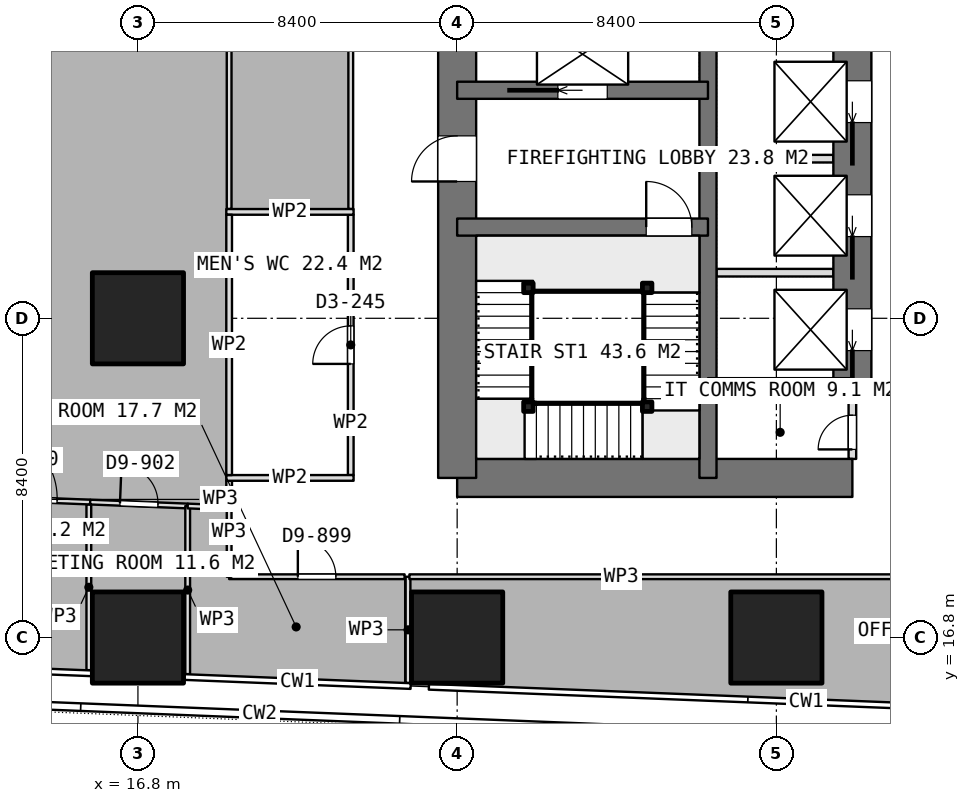
"""IFC4 building model, lengths in metres.
Left out: names, types, materials, properties, quantities, classifications, styles, units other than length and angle.
Written with IfcOpenShell. Run it as: python <this file> out.ifc"""

import sys

from ifc_helpers import new_model, si_unit, direction, frame, frame_2d, origin, origin_2d, place, context, subcontext, project, spatial, rectangle, extrude, element, fill, save


model = new_model("IFC4")
c1 = context("Model", 3, precision=1e-05, world=origin(), true_north=direction((0.0, 1.0)))
c2 = subcontext(c1, "Body", "Model", "MODEL_VIEW")
j1 = project(units=[si_unit("LENGTHUNIT", "METRE"), si_unit("PLANEANGLEUNIT", "RADIAN")], contexts=[c1])
p1 = place(None, origin())
s1 = spatial("IfcSite", under=j1, at=p1, CompositionType="ELEMENT")
p2 = place(p1, origin())
s2 = spatial("IfcBuilding", under=s1, at=p2, CompositionType="ELEMENT")
p3 = place(p2, frame((0.0, 0.0, 228.95)))
s3 = spatial("IfcBuildingStorey", under=s2, at=p3, CompositionType="ELEMENT", Elevation=228.95)
p4 = place(p3, frame((25.2, 21.0, 0.0), z_axis=(0.0, 0.0, 1.0), x_axis=(1.0, 0.0, 0.0)))
e1 = element("IfcWall", 1, at=p4, inside=s3, PredefinedType="SHEAR", context=c2, shape_type="SweptSolid", body=[
    extrude(rectangle(XDim=10.4, YDim=1.0, at=frame_2d((5.2, 0.0))), origin(), (0.0, 0.0, 1.0), 3.75),
])
p5 = place(p3, frame((25.2, 21.0, 0.0), z_axis=(0.0, 0.0, 1.0), x_axis=(0.0, 1.0, 0.0)))
e2 = element("IfcWall", 2, at=p5, inside=s3, PredefinedType="SHEAR", context=c2, shape_type="SweptSolid", body=[
    extrude(rectangle(XDim=25.2, YDim=1.0, at=frame_2d((12.6, 0.0))), origin(), (0.0, 0.0, 1.0), 3.75),
])
p6 = place(p5, frame((7.8, 0.0, 0.0)))
e3 = element("IfcOpeningElement", 3, at=p6, cuts=e2, PredefinedType="OPENING", context=c2, shape_type="SweptSolid", body=[
    extrude(rectangle(XDim=1.2, YDim=2.1, at=frame_2d((0.6, 1.05))), frame((0.0, 0.51, 0.0), z_axis=(0.0, -1.0, 0.0), x_axis=(1.0, 0.0, 0.0)), (0.0, 0.0, 1.0), 1.02),
])
p7 = place(p5, frame((14.25, 0.0, 0.0)))
e4 = element("IfcOpeningElement", 4, at=p7, cuts=e2, PredefinedType="OPENING", context=c2, shape_type="SweptSolid", body=[
    extrude(rectangle(XDim=0.9, YDim=2.1, at=frame_2d((0.45, 1.05))), frame((0.0, 0.51, 0.0), z_axis=(0.0, -1.0, 0.0), x_axis=(1.0, 0.0, 0.0)), (0.0, 0.0, 1.0), 1.02),
])
p8 = place(p5, frame((16.85, 0.0, 0.0)))
e5 = element("IfcOpeningElement", 5, at=p8, cuts=e2, PredefinedType="OPENING", context=c2, shape_type="SweptSolid", body=[
    extrude(rectangle(XDim=0.9, YDim=2.1, at=frame_2d((0.45, 1.05))), frame((0.0, 0.51, 0.0), z_axis=(0.0, -1.0, 0.0), x_axis=(1.0, 0.0, 0.0)), (0.0, 0.0, 1.0), 1.02),
])
p9 = place(p5, frame((19.025, 0.0, 0.0)))
e6 = element("IfcOpeningElement", 6, at=p9, cuts=e2, PredefinedType="OPENING", context=c2, shape_type="SweptSolid", body=[
    extrude(rectangle(XDim=1.2, YDim=2.1, at=frame_2d((0.6, 1.05))), frame((0.0, 0.51, 0.0), z_axis=(0.0, -1.0, 0.0), x_axis=(1.0, 0.0, 0.0)), (0.0, 0.0, 1.0), 1.02),
])
p10 = place(p3, frame((31.8, 21.0, 0.0), z_axis=(0.0, 0.0, 1.0), x_axis=(0.0, 1.0, 0.0)))
e7 = element("IfcWall", 7, at=p10, inside=s3, PredefinedType="SHEAR", context=c2, shape_type="SweptSolid", body=[
    extrude(rectangle(XDim=25.2, YDim=0.45, at=frame_2d((12.6, 0.0))), origin(), (0.0, 0.0, 1.0), 3.75),
])
p11 = place(p3, frame((35.6, 23.4, 0.0), z_axis=(0.0, 0.0, 1.0), x_axis=(0.0, 1.0, 0.0)))
e8 = element("IfcWall", 8, at=p11, inside=s3, PredefinedType="SHEAR", context=c2, shape_type="SweptSolid", body=[
    extrude(rectangle(XDim=18.0, YDim=1.0, at=frame_2d((9.0, 0.0))), origin(), (0.0, 0.0, 1.0), 3.75),
])
p12 = place(p11, frame((0.95, 0.0, 0.0)))
e9 = element("IfcOpeningElement", 9, at=p12, cuts=e8, PredefinedType="OPENING", context=c2, shape_type="SweptSolid", body=[
    extrude(rectangle(XDim=1.1, YDim=2.1, at=frame_2d((0.55, 1.05))), frame((0.0, 0.51, 0.0), z_axis=(0.0, -1.0, 0.0), x_axis=(1.0, 0.0, 0.0)), (0.0, 0.0, 1.0), 1.02),
])
p13 = place(p11, frame((3.95, 0.0, 0.0)))
e10 = element("IfcOpeningElement", 10, at=p13, cuts=e8, PredefinedType="OPENING", context=c2, shape_type="SweptSolid", body=[
    extrude(rectangle(XDim=1.1, YDim=2.1, at=frame_2d((0.55, 1.05))), frame((0.0, 0.51, 0.0), z_axis=(0.0, -1.0, 0.0), x_axis=(1.0, 0.0, 0.0)), (0.0, 0.0, 1.0), 1.02),
])
p14 = place(p11, frame((6.95, 0.0, 0.0)))
e11 = element("IfcOpeningElement", 11, at=p14, cuts=e8, PredefinedType="OPENING", context=c2, shape_type="SweptSolid", body=[
    extrude(rectangle(XDim=1.1, YDim=2.1, at=frame_2d((0.55, 1.05))), frame((0.0, 0.51, 0.0), z_axis=(0.0, -1.0, 0.0), x_axis=(1.0, 0.0, 0.0)), (0.0, 0.0, 1.0), 1.02),
])
p15 = place(p11, frame((9.95, 0.0, 0.0)))
e12 = element("IfcOpeningElement", 12, at=p15, cuts=e8, PredefinedType="OPENING", context=c2, shape_type="SweptSolid", body=[
    extrude(rectangle(XDim=1.1, YDim=2.1, at=frame_2d((0.55, 1.05))), frame((0.0, 0.51, 0.0), z_axis=(0.0, -1.0, 0.0), x_axis=(1.0, 0.0, 0.0)), (0.0, 0.0, 1.0), 1.02),
])
p16 = place(p11, frame((12.95, 0.0, 0.0)))
e13 = element("IfcOpeningElement", 13, at=p16, cuts=e8, PredefinedType="OPENING", context=c2, shape_type="SweptSolid", body=[
    extrude(rectangle(XDim=1.1, YDim=2.1, at=frame_2d((0.55, 1.05))), frame((0.0, 0.51, 0.0), z_axis=(0.0, -1.0, 0.0), x_axis=(1.0, 0.0, 0.0)), (0.0, 0.0, 1.0), 1.02),
])
p17 = place(p11, frame((15.95, 0.0, 0.0)))
e14 = element("IfcOpeningElement", 14, at=p17, cuts=e8, PredefinedType="OPENING", context=c2, shape_type="SweptSolid", body=[
    extrude(rectangle(XDim=1.1, YDim=2.1, at=frame_2d((0.55, 1.05))), frame((0.0, 0.51, 0.0), z_axis=(0.0, -1.0, 0.0), x_axis=(1.0, 0.0, 0.0)), (0.0, 0.0, 1.0), 1.02),
])
p18 = place(p3, frame((31.8, 23.4, 0.0), z_axis=(0.0, 0.0, 1.0), x_axis=(1.0, 0.0, 0.0)))
e15 = element("IfcWall", 15, at=p18, inside=s3, PredefinedType="SHEAR", context=c2, shape_type="SweptSolid", body=[
    extrude(rectangle(XDim=3.8, YDim=0.45, at=frame_2d((1.9, 0.0))), origin(), (0.0, 0.0, 1.0), 3.75),
])
p19 = place(p3, frame((25.2, 27.6, 0.0), z_axis=(0.0, 0.0, 1.0), x_axis=(1.0, 0.0, 0.0)))
e16 = element("IfcWall", 16, at=p19, inside=s3, PredefinedType="SHEAR", context=c2, shape_type="SweptSolid", body=[
    extrude(rectangle(XDim=6.6, YDim=0.45, at=frame_2d((3.3, 0.0))), origin(), (0.0, 0.0, 1.0), 3.75),
])
p20 = place(p19, frame((4.975, 0.0, 0.0)))
e17 = element("IfcOpeningElement", 17, at=p20, cuts=e16, PredefinedType="OPENING", context=c2, shape_type="SweptSolid", body=[
    extrude(rectangle(XDim=1.2, YDim=2.1, at=frame_2d((0.6, 1.05))), frame((0.0, 0.235, 0.0), z_axis=(0.0, -1.0, 0.0), x_axis=(1.0, 0.0, 0.0)), (0.0, 0.0, 1.0), 0.47),
])
p21 = place(p3, frame((25.2, 31.2, 0.0), z_axis=(0.0, 0.0, 1.0), x_axis=(1.0, 0.0, 0.0)))
e18 = element("IfcWall", 18, at=p21, inside=s3, PredefinedType="SHEAR", context=c2, shape_type="SweptSolid", body=[
    extrude(rectangle(XDim=6.6, YDim=0.45, at=frame_2d((3.3, 0.0))), origin(), (0.0, 0.0, 1.0), 3.75),
])
p22 = place(p21, frame((2.65, 0.0, 0.0)))
e19 = element("IfcOpeningElement", 19, at=p22, cuts=e18, PredefinedType="OPENING", context=c2, shape_type="SweptSolid", body=[
    extrude(rectangle(XDim=1.3, YDim=2.1, at=frame_2d((0.65, 1.05))), frame((0.0, 0.235, 0.0), z_axis=(0.0, -1.0, 0.0), x_axis=(1.0, 0.0, 0.0)), (0.0, 0.0, 1.0), 0.47),
])
for number, where, z_axis, x_axis in (
    (20, (16.8, 16.8, 0.0), (0.0, 0.0, 1.0), (1.0, 0.0, 0.0)),
    (21, (16.8, 25.2, 0.0), (0.0, 0.0, 1.0), (1.0, 0.0, 0.0)),
    (22, (25.2, 16.8, 0.0), (0.0, 0.0, 1.0), (1.0, 0.0, 0.0)),
    (23, (33.6, 16.8, 0.0), (0.0, 0.0, 1.0), (1.0, 0.0, 0.0)),
):
    element("IfcColumn", number, at=place(p3, frame(where, z_axis=z_axis, x_axis=x_axis)), inside=s3, PredefinedType="COLUMN", context=c2, shape_type="SweptSolid", body=[
        extrude(rectangle(XDim=2.4, YDim=2.4, at=origin_2d()), origin(), (0.0, 0.0, 1.0), 3.75),
    ])
for number, where, z_axis, x_axis in (
    (24, (32.025, 26.4, 0.0), (0.0, 0.0, 1.0), (1.0, 0.0, 0.0)),
    (25, (32.025, 29.4, 0.0), (0.0, 0.0, 1.0), (1.0, 0.0, 0.0)),
):
    element("IfcWall", number, at=place(p3, frame(where, z_axis=z_axis, x_axis=x_axis)), inside=s3, PredefinedType="PARTITIONING", context=c2, shape_type="SweptSolid", body=[
        extrude(rectangle(XDim=3.075, YDim=0.2, at=frame_2d((1.538, 0.0))), origin(), (0.0, 0.0, 1.0), 3.5),
    ])
p23 = place(p3, frame((35.6, 21.5, 0.0), z_axis=(0.0, 0.0, 1.0), x_axis=(0.0, 1.0, 0.0)))
e26 = element("IfcWall", 26, at=p23, inside=s3, PredefinedType="PARTITIONING", context=c2, shape_type="SweptSolid", body=[
    extrude(rectangle(XDim=1.675, YDim=0.2, at=frame_2d((0.837, 0.0))), origin(), (0.0, 0.0, 1.0), 3.5),
])
p24 = place(p23, frame((0.25, 0.0, 0.0)))
e27 = element("IfcOpeningElement", 27, at=p24, cuts=e26, PredefinedType="OPENING", context=c2, shape_type="SweptSolid", body=[
    extrude(rectangle(XDim=0.9, YDim=2.1, at=frame_2d((0.45, 1.05))), frame((0.0, 0.11, 0.0), z_axis=(0.0, -1.0, 0.0), x_axis=(1.0, 0.0, 0.0)), (0.0, 0.0, 1.0), 0.22),
])
for number, where, z_axis, x_axis in (
    (28, (19.125, 21.0, 0.0), (0.0, 0.0, 1.0), (1.0, 0.0, 0.0)),
    (29, (19.125, 28.0, 0.0), (0.0, 0.0, 1.0), (1.0, 0.0, 0.0)),
):
    element("IfcWall", number, at=place(p3, frame(where, z_axis=z_axis, x_axis=x_axis)), inside=s3, PredefinedType="PARTITIONING", context=c2, shape_type="SweptSolid", body=[
        extrude(rectangle(XDim=3.35, YDim=0.15, at=frame_2d((1.675, 0.0))), origin(), (0.0, 0.0, 1.0), 3.5),
    ])
p25 = place(p3, frame((19.2, 21.075, 0.0), z_axis=(0.0, 0.0, 1.0), x_axis=(0.0, 1.0, 0.0)))
e30 = element("IfcWall", 30, at=p25, inside=s3, PredefinedType="PARTITIONING", context=c2, shape_type="SweptSolid", body=[
    extrude(rectangle(XDim=6.85, YDim=0.15, at=frame_2d((3.425, 0.0))), origin(), (0.0, 0.0, 1.0), 3.5),
])
p26 = place(p3, frame((22.4, 21.075, 0.0), z_axis=(0.0, 0.0, 1.0), x_axis=(0.0, 1.0, 0.0)))
e31 = element("IfcWall", 31, at=p26, inside=s3, PredefinedType="PARTITIONING", context=c2, shape_type="SweptSolid", body=[
    extrude(rectangle(XDim=6.85, YDim=0.15, at=frame_2d((3.425, 0.0))), origin(), (0.0, 0.0, 1.0), 3.5),
])
p27 = place(p26, frame((2.925, 0.0, 0.0)))
e32 = element("IfcOpeningElement", 32, at=p27, cuts=e31, PredefinedType="OPENING", context=c2, shape_type="SweptSolid", body=[
    extrude(rectangle(XDim=1.0, YDim=2.1, at=frame_2d((0.5, 1.05))), frame((0.0, 0.085, 0.0), z_axis=(0.0, -1.0, 0.0), x_axis=(1.0, 0.0, 0.0)), (0.0, 0.0, 1.0), 0.17),
])
p28 = place(p3, frame((23.907, 15.606, 0.0), z_axis=(0.0, 0.0, 1.0), x_axis=(0.0, 1.0, 0.0)))
e33 = element("IfcWall", 33, at=p28, inside=s3, PredefinedType="PARTITIONING", context=c2, shape_type="SweptSolid", body=[
    extrude(rectangle(XDim=2.794, YDim=0.125, at=frame_2d((1.397, 0.0))), origin(), (0.0, 0.0, 1.0), 3.5),
])
p29 = place(p3, frame((23.944, 18.4, 0.0), z_axis=(0.0, 0.0, 1.0), x_axis=(1.0, 0.0, 0.0)))
e34 = element("IfcWall", 34, at=p29, inside=s3, PredefinedType="PARTITIONING", context=c2, shape_type="SweptSolid", body=[
    extrude(rectangle(XDim=27.867, YDim=0.125, at=frame_2d((13.934, 0.0))), origin(), (0.0, 0.0, 1.0), 3.5),
])
p30 = place(p29, frame((13.433, 0.0, 0.0)))
e35 = element("IfcOpeningElement", 35, at=p30, cuts=e34, PredefinedType="OPENING", context=c2, shape_type="SweptSolid", body=[
    extrude(rectangle(XDim=1.0, YDim=2.1, at=frame_2d((0.5, 1.05))), frame((0.0, 0.073, 0.0), z_axis=(0.0, -1.0, 0.0), x_axis=(1.0, 0.0, 0.0)), (0.0, 0.0, 1.0), 0.145),
])
p31 = place(p3, frame((15.508, 20.303, 0.0), z_axis=(0.0, 0.0, 1.0), x_axis=(0.0, -1.0, 0.0)))
e36 = element("IfcWall", 36, at=p31, inside=s3, PredefinedType="PARTITIONING", context=c2, shape_type="SweptSolid", body=[
    extrude(rectangle(XDim=4.361, YDim=0.125, at=frame_2d((2.181, 0.0))), origin(), (0.0, 0.0, 1.0), 3.5),
])
p32 = place(p3, frame((12.005, 20.505, 0.0), z_axis=(0.0, 0.0, 1.0), x_axis=(0.999208321211, -0.039783549637, 0.0)))
e37 = element("IfcWall", 37, at=p32, inside=s3, PredefinedType="PARTITIONING", context=c2, shape_type="SweptSolid", body=[
    extrude(rectangle(XDim=3.541, YDim=0.125, at=frame_2d((1.771, 0.0))), origin(), (0.0, 0.0, 1.0), 3.5),
])
p33 = place(p32, frame((0.87, 0.0, 0.0)))
e38 = element("IfcOpeningElement", 38, at=p33, cuts=e37, PredefinedType="OPENING", context=c2, shape_type="SweptSolid", body=[
    extrude(rectangle(XDim=1.8, YDim=2.1, at=frame_2d((0.9, 1.05))), frame((0.0, 0.073, 0.0), z_axis=(0.0, -1.0, 0.0), x_axis=(1.0, 0.0, 0.0)), (0.0, 0.0, 1.0), 0.145),
])
p34 = place(p3, frame((15.544, 20.364, 0.0), z_axis=(0.0, 0.0, 1.0), x_axis=(0.999194259908, -0.040135158736, 0.0)))
e39 = element("IfcWall", 39, at=p34, inside=s3, PredefinedType="PARTITIONING", context=c2, shape_type="SweptSolid", body=[
    extrude(rectangle(XDim=2.567, YDim=0.125, at=frame_2d((1.283, 0.0))), origin(), (0.0, 0.0, 1.0), 3.5),
])
p35 = place(p34, frame((0.784, 0.0, 0.0)))
e40 = element("IfcOpeningElement", 40, at=p35, cuts=e39, PredefinedType="OPENING", context=c2, shape_type="SweptSolid", body=[
    extrude(rectangle(XDim=1.0, YDim=2.1, at=frame_2d((0.5, 1.05))), frame((0.0, 0.073, 0.0), z_axis=(0.0, -1.0, 0.0), x_axis=(1.0, 0.0, 0.0)), (0.0, 0.0, 1.0), 0.145),
])
p36 = place(p3, frame((18.109, 20.261, 0.0), z_axis=(0.0, 0.0, 1.0), x_axis=(0.0, -1.0, 0.0)))
e41 = element("IfcWall", 41, at=p36, inside=s3, PredefinedType="PARTITIONING", context=c2, shape_type="SweptSolid", body=[
    extrude(rectangle(XDim=4.423, YDim=0.125, at=frame_2d((2.211, 0.0))), origin(), (0.0, 0.0, 1.0), 3.5),
])
p37 = place(p3, frame((19.2, 18.4, 0.0), z_axis=(0.0, 0.0, 1.0), x_axis=(1.0, 0.0, 0.0)))
e42 = element("IfcWall", 42, at=p37, inside=s3, PredefinedType="PARTITIONING", context=c2, shape_type="SweptSolid", body=[
    extrude(rectangle(XDim=4.617, YDim=0.125, at=frame_2d((2.309, 0.0))), origin(), (0.0, 0.0, 1.0), 3.5),
])
p38 = place(p37, frame((1.808, 0.0, 0.0)))
e43 = element("IfcOpeningElement", 43, at=p38, cuts=e42, PredefinedType="OPENING", context=c2, shape_type="SweptSolid", body=[
    extrude(rectangle(XDim=1.0, YDim=2.1, at=frame_2d((0.5, 1.05))), frame((0.0, 0.073, 0.0), z_axis=(0.0, -1.0, 0.0), x_axis=(1.0, 0.0, 0.0)), (0.0, 0.0, 1.0), 0.145),
])
p39 = place(p3, frame((18.11, 20.261, 0.0), z_axis=(0.0, 0.0, 1.0), x_axis=(0.999223679577, -0.039395915682, 0.0)))
e44 = element("IfcWall", 44, at=p39, inside=s3, PredefinedType="PARTITIONING", context=c2, shape_type="SweptSolid", body=[
    extrude(rectangle(XDim=1.091, YDim=0.125, at=frame_2d((0.545, 0.0))), origin(), (0.0, 0.0, 1.0), 3.5),
])
p40 = place(p3, frame((19.2, 20.218, 0.0), z_axis=(0.0, 0.0, 1.0), x_axis=(0.0, -1.0, 0.0)))
e45 = element("IfcWall", 45, at=p40, inside=s3, PredefinedType="PARTITIONING", context=c2, shape_type="SweptSolid", body=[
    extrude(rectangle(XDim=1.818, YDim=0.125, at=frame_2d((0.909, 0.0))), origin(), (0.0, 0.0, 1.0), 3.5),
])
p41 = place(p3, frame((19.2, 28.075, 0.0), z_axis=(0.0, 0.0, 1.0), x_axis=(0.0, 1.0, 0.0)))
e46 = element("IfcWall", 46, at=p41, inside=s3, PredefinedType="PARTITIONING", context=c2, shape_type="SweptSolid", body=[
    extrude(rectangle(XDim=25.075, YDim=0.125, at=frame_2d((12.538, 0.0))), origin(), (0.0, 0.0, 1.0), 3.5),
])
p42 = place(p3, frame((22.4, 53.15, 0.0), z_axis=(0.0, 0.0, 1.0), x_axis=(0.0, -1.0, 0.0)))
e47 = element("IfcWall", 47, at=p42, inside=s3, PredefinedType="PARTITIONING", context=c2, shape_type="SweptSolid", body=[
    extrude(rectangle(XDim=25.075, YDim=0.125, at=frame_2d((12.538, 0.0))), origin(), (0.0, 0.0, 1.0), 3.5),
])
p43 = place(p42, frame((11.675, 0.0, 0.0)))
e48 = element("IfcOpeningElement", 48, at=p43, cuts=e47, PredefinedType="OPENING", context=c2, shape_type="SweptSolid", body=[
    extrude(rectangle(XDim=1.8, YDim=2.1, at=frame_2d((0.9, 1.05))), frame((0.0, 0.073, 0.0), z_axis=(0.0, -1.0, 0.0), x_axis=(1.0, 0.0, 0.0)), (0.0, 0.0, 1.0), 0.145),
])
p44 = place(p3, frame((19.2, 20.925, 0.0), z_axis=(0.0, 0.0, 1.0), x_axis=(0.0, -1.0, 0.0)))
e49 = element("IfcWall", 49, at=p44, inside=s3, PredefinedType="PARTITIONING", context=c2, shape_type="SweptSolid", body=[
    extrude(rectangle(XDim=0.707, YDim=0.15, at=frame_2d((0.354, 0.0))), origin(), (0.0, 0.0, 1.0), 3.5),
])
for number, where, z_axis, x_axis in (
    (50, (30.2, 26.0, 0.0), (0.0, 0.0, 1.0), (1.0, 0.0, 0.0)),
    (51, (30.2, 22.875, 0.0), (0.0, 0.0, 1.0), (1.0, 0.0, 0.0)),
    (52, (27.075, 22.875, 0.0), (0.0, 0.0, 1.0), (1.0, 0.0, 0.0)),
    (53, (27.075, 26.0, 0.0), (0.0, 0.0, 1.0), (1.0, 0.0, 0.0)),
):
    element("IfcColumn", number, at=place(p3, frame(where, z_axis=z_axis, x_axis=x_axis)), inside=s3, PredefinedType="COLUMN", context=c2, shape_type="SweptSolid", body=[
        extrude(rectangle(XDim=0.25, YDim=0.25, at=origin_2d()), origin(), (0.0, 0.0, 1.0), 3.75),
    ])
p45 = place(p6, origin())
e54 = element("IfcDoor", 54, at=p45, inside=s3, OperationType="SINGLE_SWING_LEFT", PredefinedType="DOOR", context=c2, shape_type="SweptSolid", body=[
    extrude(rectangle(XDim=1.2, YDim=2.1, at=frame_2d((0.6, 1.05))), frame((0.0, 0.025, 0.0), z_axis=(0.0, -1.0, 0.0), x_axis=(1.0, 0.0, 0.0)), (0.0, 0.0, 1.0), 0.05),
])
fill(e3, e54)
p46 = place(p24, origin())
e55 = element("IfcDoor", 55, at=p46, inside=s3, OperationType="SINGLE_SWING_LEFT", PredefinedType="DOOR", context=c2, shape_type="SweptSolid", body=[
    extrude(rectangle(XDim=0.9, YDim=2.1, at=frame_2d((0.45, 1.05))), frame((0.0, 0.025, 0.0), z_axis=(0.0, -1.0, 0.0), x_axis=(1.0, 0.0, 0.0)), (0.0, 0.0, 1.0), 0.05),
])
fill(e27, e55)
p47 = place(p12, origin())
e56 = element("IfcDoor", 56, at=p47, inside=s3, OperationType="SLIDING_TO_LEFT", PredefinedType="USERDEFINED", context=c2, shape_type="SweptSolid", body=[
    extrude(rectangle(XDim=1.1, YDim=2.1, at=frame_2d((0.55, 1.05))), frame((0.0, 0.025, 0.0), z_axis=(0.0, -1.0, 0.0), x_axis=(1.0, 0.0, 0.0)), (0.0, 0.0, 1.0), 0.05),
])
fill(e9, e56)
p48 = place(p13, origin())
e57 = element("IfcDoor", 57, at=p48, inside=s3, OperationType="SLIDING_TO_LEFT", PredefinedType="USERDEFINED", context=c2, shape_type="SweptSolid", body=[
    extrude(rectangle(XDim=1.1, YDim=2.1, at=frame_2d((0.55, 1.05))), frame((0.0, 0.025, 0.0), z_axis=(0.0, -1.0, 0.0), x_axis=(1.0, 0.0, 0.0)), (0.0, 0.0, 1.0), 0.05),
])
fill(e10, e57)
p49 = place(p14, origin())
e58 = element("IfcDoor", 58, at=p49, inside=s3, OperationType="SLIDING_TO_LEFT", PredefinedType="USERDEFINED", context=c2, shape_type="SweptSolid", body=[
    extrude(rectangle(XDim=1.1, YDim=2.1, at=frame_2d((0.55, 1.05))), frame((0.0, 0.025, 0.0), z_axis=(0.0, -1.0, 0.0), x_axis=(1.0, 0.0, 0.0)), (0.0, 0.0, 1.0), 0.05),
])
fill(e11, e58)
p50 = place(p22, origin())
e59 = element("IfcDoor", 59, at=p50, inside=s3, OperationType="SLIDING_TO_LEFT", PredefinedType="USERDEFINED", context=c2, shape_type="SweptSolid", body=[
    extrude(rectangle(XDim=1.3, YDim=2.1, at=frame_2d((0.65, 1.05))), frame((0.0, 0.025, 0.0), z_axis=(0.0, -1.0, 0.0), x_axis=(1.0, 0.0, 0.0)), (0.0, 0.0, 1.0), 0.05),
])
fill(e19, e59)
p51 = place(p27, origin())
e60 = element("IfcDoor", 60, at=p51, inside=s3, OperationType="SINGLE_SWING_LEFT", PredefinedType="DOOR", context=c2, shape_type="SweptSolid", body=[
    extrude(rectangle(XDim=1.0, YDim=2.1, at=frame_2d((0.5, 1.05))), frame((0.0, 0.025, 0.0), z_axis=(0.0, -1.0, 0.0), x_axis=(1.0, 0.0, 0.0)), (0.0, 0.0, 1.0), 0.05),
])
fill(e32, e60)
p52 = place(p33, origin())
e61 = element("IfcDoor", 61, at=p52, inside=s3, OperationType="DOUBLE_DOOR_SINGLE_SWING", PredefinedType="DOOR", context=c2, shape_type="SweptSolid", body=[
    extrude(rectangle(XDim=1.8, YDim=2.1, at=frame_2d((0.9, 1.05))), frame((0.0, 0.025, 0.0), z_axis=(0.0, -1.0, 0.0), x_axis=(1.0, 0.0, 0.0)), (0.0, 0.0, 1.0), 0.05),
])
fill(e38, e61)
p53 = place(p35, origin())
e62 = element("IfcDoor", 62, at=p53, inside=s3, OperationType="SINGLE_SWING_LEFT", PredefinedType="DOOR", context=c2, shape_type="SweptSolid", body=[
    extrude(rectangle(XDim=1.0, YDim=2.1, at=frame_2d((0.5, 1.05))), frame((0.0, 0.025, 0.0), z_axis=(0.0, -1.0, 0.0), x_axis=(1.0, 0.0, 0.0)), (0.0, 0.0, 1.0), 0.05),
])
fill(e40, e62)
p54 = place(p38, origin())
e63 = element("IfcDoor", 63, at=p54, inside=s3, OperationType="SINGLE_SWING_LEFT", PredefinedType="DOOR", context=c2, shape_type="SweptSolid", body=[
    extrude(rectangle(XDim=1.0, YDim=2.1, at=frame_2d((0.5, 1.05))), frame((0.0, 0.025, 0.0), z_axis=(0.0, -1.0, 0.0), x_axis=(1.0, 0.0, 0.0)), (0.0, 0.0, 1.0), 0.05),
])
fill(e43, e63)
p55 = place(p20, origin())
e64 = element("IfcDoor", 64, at=p55, inside=s3, OperationType="SINGLE_SWING_RIGHT", PredefinedType="DOOR", context=c2, shape_type="SweptSolid", body=[
    extrude(rectangle(XDim=1.2, YDim=2.1, at=frame_2d((0.6, 1.05))), frame((0.0, 0.025, 0.0), z_axis=(0.0, -1.0, 0.0), x_axis=(1.0, 0.0, 0.0)), (0.0, 0.0, 1.0), 0.05),
])
fill(e17, e64)
save(model, sys.argv[1])
